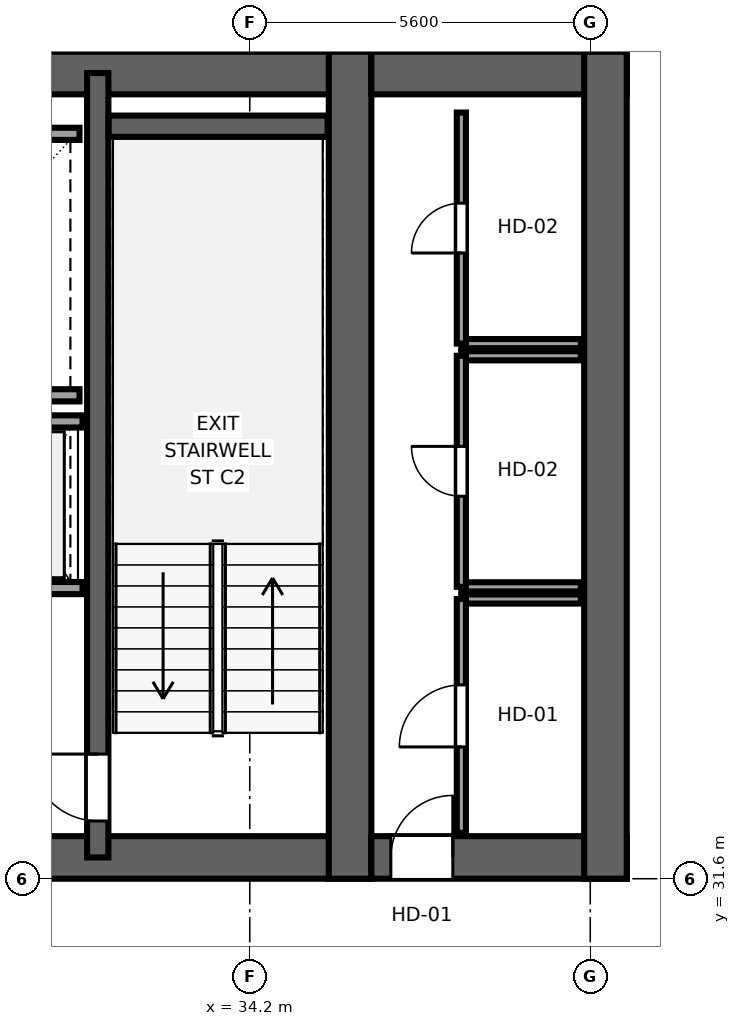
"""IFC4 building model, lengths in metres.
Left out: names, types, materials, properties, quantities, classifications, styles, units other than length and angle.
Written with IfcOpenShell. Run it as: python <this file> out.ifc"""

import sys

from ifc_helpers import new_model, si_unit, direction, frame, frame_2d, origin, place, context, subcontext, project, spatial, rectangle, extrude, source, transform, mapped, element, fill, save


model = new_model("IFC4")
c1 = context("Model", 3, precision=1e-05, world=origin(), true_north=direction((0.0, 1.0)))
c2 = subcontext(c1, "Body", "Model", "MODEL_VIEW")
j1 = project(units=[si_unit("LENGTHUNIT", "METRE"), si_unit("PLANEANGLEUNIT", "RADIAN")], contexts=[c1])
p1 = place(None, origin())
s1 = spatial("IfcSite", under=j1, at=p1, CompositionType="ELEMENT")
p2 = place(p1, origin())
s2 = spatial("IfcBuilding", under=s1, at=p2, CompositionType="ELEMENT")
p3 = place(p2, frame((0.0, 0.0, 111.55)))
s3 = spatial("IfcBuildingStorey", under=s2, at=p3, CompositionType="ELEMENT", Elevation=111.55)
p4 = place(p3, frame((9.8, 31.95, 0.0), z_axis=(0.0, 0.0, 1.0), x_axis=(1.0, 0.0, 0.0)))
e1 = element("IfcWall", 1, at=p4, inside=s3, PredefinedType="SHEAR", context=c2, shape_type="SweptSolid", body=[
    extrude(rectangle(XDim=26.4, YDim=0.7, at=frame_2d((13.2, 0.0))), origin(), (0.0, 0.0, 1.0), 3.55),
])
p5 = place(p4, frame((6.32, 0.0, 0.0), z_axis=(0.0, 0.0, 1.0), x_axis=(-1.0, 0.0, 0.0)))
e2 = element("IfcOpeningElement", 2, at=p5, cuts=e1, PredefinedType="OPENING", context=c2, shape_type="SweptSolid", body=[
    extrude(rectangle(XDim=1.5, YDim=2.04, at=frame_2d((0.75, 1.02))), frame((0.0, 0.36, 0.0), z_axis=(0.0, -1.0, 0.0), x_axis=(1.0, 0.0, 0.0)), (0.0, 0.0, 1.0), 0.72),
])
p6 = place(p4, frame((13.95, 0.0, 0.0), z_axis=(0.0, 0.0, 1.0), x_axis=(-1.0, 0.0, 0.0)))
e3 = element("IfcOpeningElement", 3, at=p6, cuts=e1, PredefinedType="OPENING", context=c2, shape_type="SweptSolid", body=[
    extrude(rectangle(XDim=1.5, YDim=2.04, at=frame_2d((0.75, 1.02))), frame((0.0, 0.36, 0.0), z_axis=(0.0, -1.0, 0.0), x_axis=(1.0, 0.0, 0.0)), (0.0, 0.0, 1.0), 0.72),
])
p7 = place(p4, frame((20.25, 0.0, 0.0), z_axis=(0.0, 0.0, 1.0), x_axis=(-1.0, 0.0, 0.0)))
e4 = element("IfcOpeningElement", 4, at=p7, cuts=e1, PredefinedType="OPENING", context=c2, shape_type="SweptSolid", body=[
    extrude(rectangle(XDim=1.5, YDim=2.04, at=frame_2d((0.75, 1.02))), frame((0.0, 0.36, 0.0), z_axis=(0.0, -1.0, 0.0), x_axis=(1.0, 0.0, 0.0)), (0.0, 0.0, 1.0), 0.72),
])
p8 = place(p4, frame((8.37, 0.0, 0.0), z_axis=(0.0, 0.0, 1.0), x_axis=(-1.0, 0.0, 0.0)))
e5 = element("IfcOpeningElement", 5, at=p8, cuts=e1, PredefinedType="OPENING", context=c2, shape_type="SweptSolid", body=[
    extrude(rectangle(XDim=0.82, YDim=2.01, at=frame_2d((0.41, 1.005))), frame((0.0, 0.36, 0.0), z_axis=(0.0, -1.0, 0.0), x_axis=(1.0, 0.0, 0.0)), (0.0, 0.0, 1.0), 0.72),
])
p9 = place(p3, frame((9.8, 44.85, 0.0), z_axis=(0.0, 0.0, 1.0), x_axis=(1.0, 0.0, 0.0)))
e6 = element("IfcWall", 6, at=p9, inside=s3, PredefinedType="SHEAR", context=c2, shape_type="SweptSolid", body=[
    extrude(rectangle(XDim=26.4, YDim=0.7, at=frame_2d((13.2, 0.0))), origin(), (0.0, 0.0, 1.0), 3.55),
])
p10 = place(p3, frame((35.85, 31.6, 0.0), z_axis=(0.0, 0.0, 1.0), x_axis=(0.0, 1.0, 0.0)))
e7 = element("IfcWall", 7, at=p10, inside=s3, PredefinedType="SHEAR", context=c2, shape_type="SweptSolid", body=[
    extrude(rectangle(XDim=13.6, YDim=0.7, at=frame_2d((6.8, 0.0))), origin(), (0.0, 0.0, 1.0), 3.55),
])
p11 = place(p3, frame((31.7, 31.95, 0.0), z_axis=(0.0, 0.0, 1.0), x_axis=(0.0, 1.0, 0.0)))
e8 = element("IfcWall", 8, at=p11, inside=s3, PredefinedType="SHEAR", context=c2, shape_type="SweptSolid", body=[
    extrude(rectangle(XDim=12.9, YDim=0.35, at=frame_2d((6.45, 0.0))), origin(), (0.0, 0.0, 1.0), 3.55),
])
p12 = place(p11, frame((1.7, 0.0, 0.0), z_axis=(0.0, 0.0, 1.0), x_axis=(-1.0, 0.0, 0.0)))
e9 = element("IfcOpeningElement", 9, at=p12, cuts=e8, PredefinedType="OPENING", context=c2, shape_type="SweptSolid", body=[
    extrude(rectangle(XDim=1.1, YDim=2.12, at=frame_2d((0.55, 1.06))), frame((0.0, 0.185, 0.0), z_axis=(0.0, -1.0, 0.0), x_axis=(1.0, 0.0, 0.0)), (0.0, 0.0, 1.0), 0.37),
])
p13 = place(p3, frame((36.2, 31.95, 0.0), z_axis=(0.0, 0.0, 1.0), x_axis=(1.0, 0.0, 0.0)))
e10 = element("IfcWall", 10, at=p13, inside=s3, PredefinedType="SHEAR", context=c2, shape_type="SweptSolid", body=[
    extrude(rectangle(XDim=4.2, YDim=0.7, at=frame_2d((2.1, 0.0))), origin(), (0.0, 0.0, 1.0), 3.55),
])
p14 = place(p13, frame((1.34, 0.0, 0.0), z_axis=(0.0, 0.0, 1.0), x_axis=(-1.0, 0.0, 0.0)))
e11 = element("IfcOpeningElement", 11, at=p14, cuts=e10, PredefinedType="OPENING", context=c2, shape_type="SweptSolid", body=[
    extrude(rectangle(XDim=1.02, YDim=2.03, at=frame_2d((0.51, 1.015))), frame((0.0, 0.36, 0.0), z_axis=(0.0, -1.0, 0.0), x_axis=(1.0, 0.0, 0.0)), (0.0, 0.0, 1.0), 0.72),
])
p15 = place(p3, frame((36.2, 44.85, 0.0), z_axis=(0.0, 0.0, 1.0), x_axis=(1.0, 0.0, 0.0)))
e12 = element("IfcWall", 12, at=p15, inside=s3, PredefinedType="SHEAR", context=c2, shape_type="SweptSolid", body=[
    extrude(rectangle(XDim=4.2, YDim=0.7, at=frame_2d((2.1, 0.0))), origin(), (0.0, 0.0, 1.0), 3.55),
])
p16 = place(p3, frame((40.05, 31.6, 0.0), z_axis=(0.0, 0.0, 1.0), x_axis=(0.0, 1.0, 0.0)))
e13 = element("IfcWall", 13, at=p16, inside=s3, PredefinedType="SHEAR", context=c2, shape_type="SweptSolid", body=[
    extrude(rectangle(XDim=13.6, YDim=0.7, at=frame_2d((6.8, 0.0))), origin(), (0.0, 0.0, 1.0), 3.55),
])
p17 = place(p3, frame((31.88, 43.975, 0.0), z_axis=(0.0, 0.0, 1.0), x_axis=(1.0, 0.0, 0.0)))
e14 = element("IfcWall", 14, at=p17, inside=s3, PredefinedType="SHEAR", context=c2, shape_type="SweptSolid", body=[
    extrude(rectangle(XDim=3.6, YDim=0.35, at=frame_2d((1.8, 0.0))), origin(), (0.0, 0.0, 1.0), 3.55),
])
for number, where, z_axis, x_axis in (
    (15, (27.3, 39.55, 0.0), (0.0, 0.0, 1.0), (1.0, 0.0, 0.0)),
    (16, (27.3, 43.85, 0.0), (0.0, 0.0, 1.0), (1.0, 0.0, 0.0)),
):
    element("IfcWall", number, at=place(p3, frame(where, z_axis=z_axis, x_axis=x_axis)), inside=s3, PredefinedType="SOLIDWALL", context=c2, shape_type="SweptSolid", body=[
        extrude(rectangle(XDim=4.1, YDim=0.2, at=frame_2d((2.05, 0.0))), origin(), (0.0, 0.0, 1.0), 3.37),
    ])
p18 = place(p3, frame((27.375, 36.38, 0.0), z_axis=(0.0, 0.0, 1.0), x_axis=(1.0, 0.0, 0.0)))
e17 = element("IfcWall", 17, at=p18, inside=s3, PredefinedType="SOLIDWALL", context=c2, shape_type="SweptSolid", body=[
    extrude(rectangle(XDim=4.075, YDim=0.2, at=frame_2d((2.038, 0.0))), origin(), (0.0, 0.0, 1.0), 3.37),
])
p19 = place(p18, frame((0.525, 0.0, 0.0)))
e18 = element("IfcOpeningElement", 18, at=p19, cuts=e17, PredefinedType="OPENING", context=c2, shape_type="SweptSolid", body=[
    extrude(rectangle(XDim=1.1, YDim=2.12, at=frame_2d((0.55, 1.06))), frame((0.0, 0.11, 0.0), z_axis=(0.0, -1.0, 0.0), x_axis=(1.0, 0.0, 0.0)), (0.0, 0.0, 1.0), 0.22),
])
p20 = place(p18, frame((2.425, 0.0, 0.0)))
e19 = element("IfcOpeningElement", 19, at=p20, cuts=e17, PredefinedType="OPENING", context=c2, shape_type="SweptSolid", body=[
    extrude(rectangle(XDim=1.1, YDim=2.12, at=frame_2d((0.55, 1.06))), frame((0.0, 0.11, 0.0), z_axis=(0.0, -1.0, 0.0), x_axis=(1.0, 0.0, 0.0)), (0.0, 0.0, 1.0), 0.22),
])
p21 = place(p3, frame((27.375, 39.12, 0.0), z_axis=(0.0, 0.0, 1.0), x_axis=(1.0, 0.0, 0.0)))
e20 = element("IfcWall", 20, at=p21, inside=s3, PredefinedType="SOLIDWALL", context=c2, shape_type="SweptSolid", body=[
    extrude(rectangle(XDim=4.075, YDim=0.2, at=frame_2d((2.038, 0.0))), origin(), (0.0, 0.0, 1.0), 3.37),
])
p22 = place(p3, frame((37.68, 36.2, 0.0), z_axis=(0.0, 0.0, 1.0), x_axis=(1.0, 0.0, 0.0)))
e21 = element("IfcWall", 21, at=p22, inside=s3, PredefinedType="PARTITIONING", context=c2, shape_type="SweptSolid", body=[
    extrude(rectangle(XDim=1.965, YDim=0.15, at=frame_2d((0.982, 0.0))), origin(), (0.0, 0.0, 1.0), 3.37),
])
p23 = place(p3, frame((37.68, 32.355, 0.0), z_axis=(0.0, 0.0, 1.0), x_axis=(0.0, 1.0, 0.0)))
e22 = element("IfcWall", 22, at=p23, inside=s3, PredefinedType="PARTITIONING", context=c2, shape_type="SweptSolid", body=[
    extrude(rectangle(XDim=3.845, YDim=0.15, at=frame_2d((1.922, 0.0))), origin(), (0.0, 0.0, 1.0), 3.37),
])
p24 = place(p23, frame((1.413, 0.0, 0.0)))
e23 = element("IfcOpeningElement", 23, at=p24, cuts=e22, PredefinedType="OPENING", context=c2, shape_type="SweptSolid", body=[
    extrude(rectangle(XDim=1.02, YDim=2.03, at=frame_2d((0.51, 1.015))), frame((0.0, 0.085, 0.0), z_axis=(0.0, -1.0, 0.0), x_axis=(1.0, 0.0, 0.0)), (0.0, 0.0, 1.0), 0.17),
])
for number, where, z_axis, x_axis in (
    (24, (37.68, 36.4, 0.0), (0.0, 0.0, 1.0), (1.0, 0.0, 0.0)),
    (25, (37.68, 40.2, 0.0), (0.0, 0.0, 1.0), (1.0, 0.0, 0.0)),
):
    element("IfcWall", number, at=place(p3, frame(where, z_axis=z_axis, x_axis=x_axis)), inside=s3, PredefinedType="PARTITIONING", context=c2, shape_type="SweptSolid", body=[
        extrude(rectangle(XDim=1.965, YDim=0.15, at=frame_2d((0.982, 0.0))), origin(), (0.0, 0.0, 1.0), 3.37),
    ])
p25 = place(p3, frame((37.68, 36.4, 0.0), z_axis=(0.0, 0.0, 1.0), x_axis=(0.0, 1.0, 0.0)))
e26 = element("IfcWall", 26, at=p25, inside=s3, PredefinedType="PARTITIONING", context=c2, shape_type="SweptSolid", body=[
    extrude(rectangle(XDim=3.8, YDim=0.15, at=frame_2d((1.9, 0.0))), origin(), (0.0, 0.0, 1.0), 3.37),
])
p26 = place(p25, frame((1.49, 0.0, 0.0)))
e27 = element("IfcOpeningElement", 27, at=p26, cuts=e26, PredefinedType="OPENING", context=c2, shape_type="SweptSolid", body=[
    extrude(rectangle(XDim=0.82, YDim=2.01, at=frame_2d((0.41, 1.005))), frame((0.0, 0.085, 0.0), z_axis=(0.0, -1.0, 0.0), x_axis=(1.0, 0.0, 0.0)), (0.0, 0.0, 1.0), 0.17),
])
p27 = place(p3, frame((37.68, 40.4, 0.0), z_axis=(0.0, 0.0, 1.0), x_axis=(1.0, 0.0, 0.0)))
e28 = element("IfcWall", 28, at=p27, inside=s3, PredefinedType="PARTITIONING", context=c2, shape_type="SweptSolid", body=[
    extrude(rectangle(XDim=1.965, YDim=0.15, at=frame_2d((0.982, 0.0))), origin(), (0.0, 0.0, 1.0), 3.37),
])
p28 = place(p3, frame((37.68, 40.4, 0.0), z_axis=(0.0, 0.0, 1.0), x_axis=(0.0, 1.0, 0.0)))
e29 = element("IfcWall", 29, at=p28, inside=s3, PredefinedType="PARTITIONING", context=c2, shape_type="SweptSolid", body=[
    extrude(rectangle(XDim=3.8, YDim=0.15, at=frame_2d((1.9, 0.0))), origin(), (0.0, 0.0, 1.0), 3.37),
])
p29 = place(p28, frame((1.49, 0.0, 0.0)))
e30 = element("IfcOpeningElement", 30, at=p29, cuts=e29, PredefinedType="OPENING", context=c2, shape_type="SweptSolid", body=[
    extrude(rectangle(XDim=0.82, YDim=2.01, at=frame_2d((0.41, 1.005))), frame((0.0, 0.085, 0.0), z_axis=(0.0, -1.0, 0.0), x_axis=(1.0, 0.0, 0.0)), (0.0, 0.0, 1.0), 0.17),
])
m1 = source(origin(), c2, "Body", "SweptSolid", [
    extrude(rectangle(XDim=1.1, YDim=2.12, at=frame_2d((0.55, 1.06))), frame((0.0, 0.025, 0.0), z_axis=(0.0, -1.0, 0.0), x_axis=(1.0, 0.0, 0.0)), (0.0, 0.0, 1.0), 0.05),
])
p30 = place(p12, origin())
e31 = element("IfcDoor", 31, at=p30, inside=s3, OperationType="SINGLE_SWING_RIGHT", PredefinedType="DOOR", context=c2, shape_type="MappedRepresentation", body=[
    mapped(m1, transform((0.0, 0.0, 0.0), x_axis=(1.0, 0.0, 0.0), y_axis=(0.0, 1.0, 0.0), z_axis=(0.0, 0.0, 1.0), scale=1.0)),
])
fill(e9, e31)
m2 = source(origin(), c2, "Body", "SweptSolid", [
    extrude(rectangle(XDim=1.02, YDim=2.03, at=frame_2d((0.51, 1.015))), frame((0.0, 0.025, 0.0), z_axis=(0.0, -1.0, 0.0), x_axis=(1.0, 0.0, 0.0)), (0.0, 0.0, 1.0), 0.05),
])
p31 = place(p14, origin())
e32 = element("IfcDoor", 32, at=p31, inside=s3, OperationType="SINGLE_SWING_RIGHT", PredefinedType="DOOR", context=c2, shape_type="MappedRepresentation", body=[
    mapped(m2, transform((0.0, 0.0, 0.0), x_axis=(1.0, 0.0, 0.0), y_axis=(0.0, 1.0, 0.0), z_axis=(0.0, 0.0, 1.0), scale=1.0)),
])
fill(e11, e32)
p32 = place(p24, origin())
e33 = element("IfcDoor", 33, at=p32, inside=s3, OperationType="SINGLE_SWING_LEFT", PredefinedType="DOOR", context=c2, shape_type="MappedRepresentation", body=[
    mapped(m2, transform((0.0, 0.0, 0.0), x_axis=(1.0, 0.0, 0.0), y_axis=(0.0, 1.0, 0.0), z_axis=(0.0, 0.0, 1.0), scale=1.0)),
])
fill(e23, e33)
m3 = source(origin(), c2, "Body", "SweptSolid", [
    extrude(rectangle(XDim=0.82, YDim=2.01, at=frame_2d((0.41, 1.005))), frame((0.0, 0.025, 0.0), z_axis=(0.0, -1.0, 0.0), x_axis=(1.0, 0.0, 0.0)), (0.0, 0.0, 1.0), 0.05),
])
p33 = place(p26, origin())
e34 = element("IfcDoor", 34, at=p33, inside=s3, OperationType="SINGLE_SWING_RIGHT", PredefinedType="DOOR", context=c2, shape_type="MappedRepresentation", body=[
    mapped(m3, transform((0.0, 0.0, 0.0), x_axis=(1.0, 0.0, 0.0), y_axis=(0.0, 1.0, 0.0), z_axis=(0.0, 0.0, 1.0), scale=1.0)),
])
fill(e27, e34)
p34 = place(p29, origin())
e35 = element("IfcDoor", 35, at=p34, inside=s3, OperationType="SINGLE_SWING_LEFT", PredefinedType="DOOR", context=c2, shape_type="MappedRepresentation", body=[
    mapped(m3, transform((0.0, 0.0, 0.0), x_axis=(1.0, 0.0, 0.0), y_axis=(0.0, 1.0, 0.0), z_axis=(0.0, 0.0, 1.0), scale=1.0)),
])
fill(e30, e35)
save(model, sys.argv[1])
